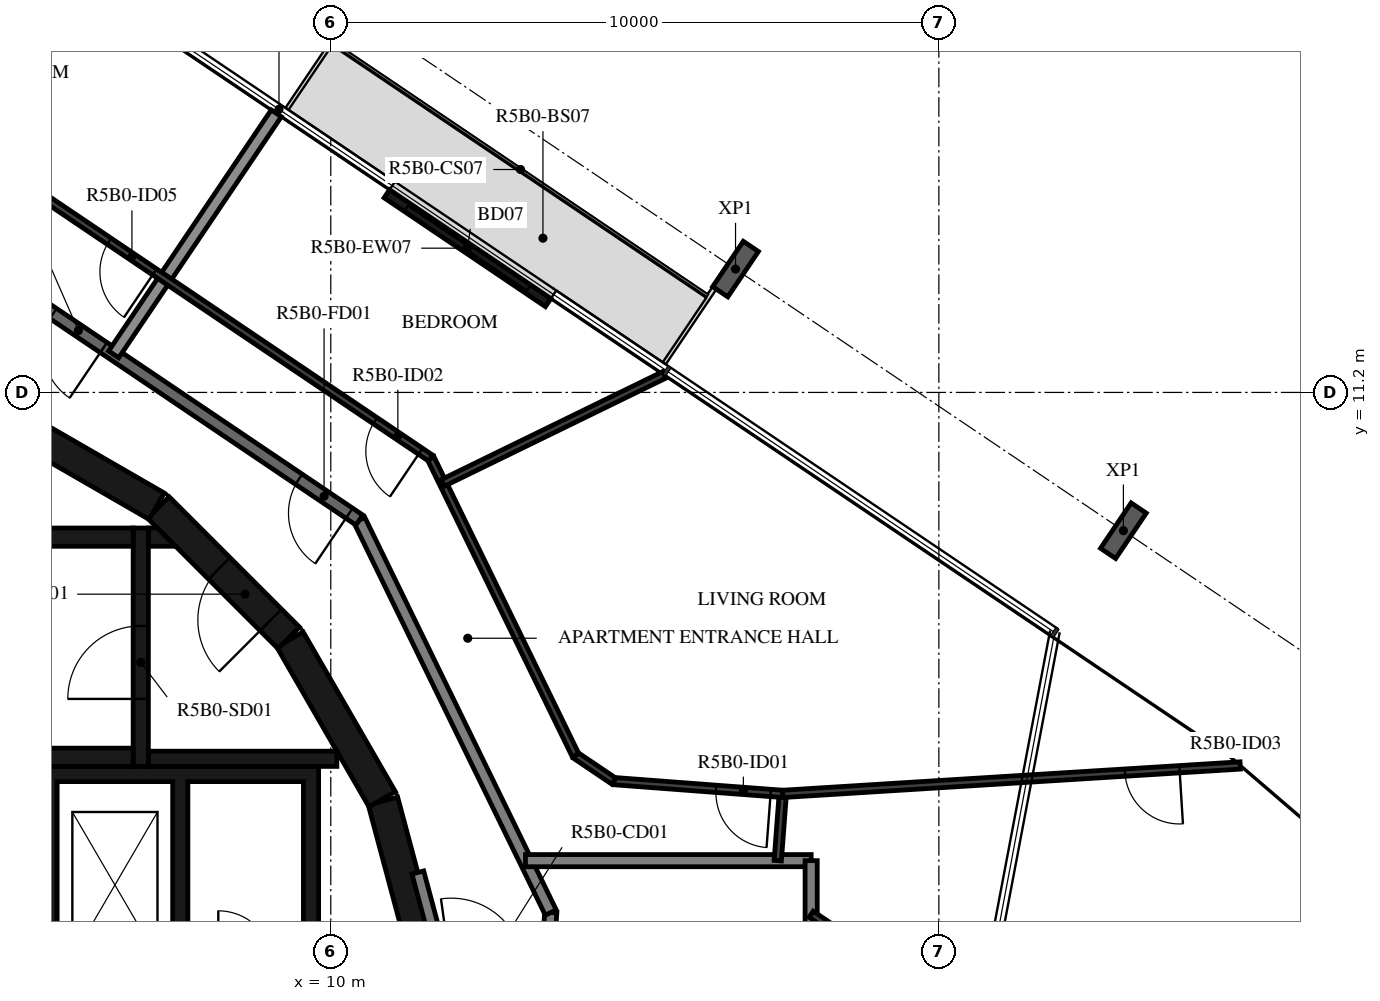
"""IFC4 building model, lengths in metres.
Left out: names, types, materials, properties, quantities, classifications, styles, units other than length and angle.
Written with IfcOpenShell. Run it as: python <this file> out.ifc"""

import sys

from ifc_helpers import new_model, si_unit, direction, frame, frame_2d, origin, origin_2d, place, context, subcontext, project, spatial, polyline, rectangle, i_section, outline, extrude, element, fill, save


model = new_model("IFC4")
c1 = context("Model", 3, precision=1e-05, world=origin(), true_north=direction((0.0, 1.0)))
c2 = subcontext(c1, "Body", "Model", "MODEL_VIEW")
j1 = project(units=[si_unit("LENGTHUNIT", "METRE"), si_unit("PLANEANGLEUNIT", "RADIAN")], contexts=[c1])
p1 = place(None, origin())
s1 = spatial("IfcSite", under=j1, at=p1, CompositionType="ELEMENT")
p2 = place(p1, origin())
s2 = spatial("IfcBuilding", under=s1, at=p2, CompositionType="ELEMENT")
p3 = place(p2, frame((0.0, 0.0, 202.4)))
s3 = spatial("IfcBuildingStorey", under=s2, at=p3, CompositionType="ELEMENT", Elevation=202.4)
for number, where, z_axis, x_axis in (
    (1, (23.035, 8.926, -0.38), (0.0, 0.0, 1.0), (0.829, -0.559, 0.0)),
    (2, (16.656, 13.228, -0.38), (0.0, 0.0, 1.0), (0.829, -0.559, 0.0)),
):
    element("IfcColumn", number, at=place(p3, frame(where, z_axis=z_axis, x_axis=x_axis)), inside=s3, PredefinedType="COLUMN", context=c2, shape_type="SweptSolid", body=[
        extrude(i_section(OverallWidth=0.3, OverallDepth=0.9, WebThickness=0.019, FlangeThickness=0.035, FilletRadius=0.03, at=origin_2d()), origin(), (0.0, 0.0, 1.0), 3.5),
    ])
p4 = place(p3, frame((13.574, 12.677, 0.0), z_axis=(0.0, 0.0, 1.0), x_axis=(-0.829068838882, 0.55914654644, 0.0)))
e3 = element("IfcWall", 3, at=p4, inside=s3, PredefinedType="STANDARD", context=c2, shape_type="SweptSolid", body=[
    extrude(rectangle(XDim=3.2, YDim=0.16, at=frame_2d((1.6, 0.0))), origin(), (0.0, 0.0, 1.0), 3.12),
])
p5 = place(p4, frame((0.4, 0.0, 0.0)))
e4 = element("IfcOpeningElement", 4, at=p5, cuts=e3, PredefinedType="OPENING", context=c2, shape_type="SweptSolid", body=[
    extrude(rectangle(XDim=2.4, YDim=2.4, at=frame_2d((1.2, 1.2))), frame((0.0, 0.09, 0.0), z_axis=(0.0, -1.0, 0.0), x_axis=(1.0, 0.0, 0.0)), (0.0, 0.0, 1.0), 0.18),
])
for number, where, z_axis, x_axis in (
    (5, (11.643, 1.55, 0.0), (0.0, 0.0, 1.0), (-0.259, 0.966, 0.0)),
    (6, (10.845, 4.51, 0.0), (0.0, 0.0, 1.0), (-0.5, 0.866, 0.0)),
):
    element("IfcWall", number, at=place(p3, frame(where, z_axis=z_axis, x_axis=x_axis)), inside=s3, PredefinedType="SHEAR", context=c2, shape_type="SweptSolid", body=[
        extrude(rectangle(XDim=3.033, YDim=0.5, at=frame_2d((1.516, 0.0))), origin(), (0.0, 0.0, 1.0), 3.12),
    ])
p6 = place(p3, frame((9.308, 7.164, 0.0), z_axis=(0.0, 0.0, 1.0), x_axis=(-0.707106781187, 0.707106781187, 0.0)))
e7 = element("IfcWall", 7, at=p6, inside=s3, PredefinedType="SHEAR", context=c2, shape_type="SweptSolid", body=[
    extrude(rectangle(XDim=3.032, YDim=0.5, at=frame_2d((1.516, 0.0))), origin(), (0.0, 0.0, 1.0), 3.12),
])
p7 = place(p6, frame((0.416, 0.0, 0.0)))
e8 = element("IfcOpeningElement", 8, at=p7, cuts=e7, PredefinedType="OPENING", context=c2, shape_type="SweptSolid", body=[
    extrude(rectangle(XDim=1.2, YDim=2.1, at=frame_2d((0.6, 1.05))), frame((0.0, 0.26, 0.0), z_axis=(0.0, -1.0, 0.0), x_axis=(1.0, 0.0, 0.0)), (0.0, 0.0, 1.0), 0.52),
])
p8 = place(p3, frame((7.137, 9.329, 0.0), z_axis=(0.0, 0.0, 1.0), x_axis=(-0.865975092491, 0.500087131594, 0.0)))
e9 = element("IfcWall", 9, at=p8, inside=s3, PredefinedType="SHEAR", context=c2, shape_type="SweptSolid", body=[
    extrude(rectangle(XDim=3.033, YDim=0.5, at=frame_2d((1.516, 0.0))), origin(), (0.0, 0.0, 1.0), 3.12),
])
for number, where, z_axis, x_axis in (
    (10, (0.0, 5.2, 0.0), (0.0, 0.0, 1.0), (1.0, 0.0, 0.0)),
    (11, (0.0, 8.82, 0.0), (0.0, 0.0, 1.0), (1.0, 0.0, 0.0)),
):
    element("IfcWall", number, at=place(p3, frame(where, z_axis=z_axis, x_axis=x_axis)), inside=s3, PredefinedType="SHEAR", context=c2, shape_type="SweptSolid", body=[
        extrude(rectangle(XDim=6.75, YDim=0.3, at=frame_2d((3.375, 0.0))), origin(), (0.0, 0.0, 1.0), 3.12),
    ])
p9 = place(p3, frame((6.875, 5.05, 0.0), z_axis=(0.0, 0.0, 1.0), x_axis=(0.0, 1.0, 0.0)))
e12 = element("IfcWall", 12, at=p9, inside=s3, PredefinedType="SHEAR", context=c2, shape_type="SweptSolid", body=[
    extrude(rectangle(XDim=3.92, YDim=0.25, at=frame_2d((1.96, 0.0))), origin(), (0.0, 0.0, 1.0), 3.12),
])
p10 = place(p9, frame((1.11, 0.0, 0.0)))
e13 = element("IfcOpeningElement", 13, at=p10, cuts=e12, PredefinedType="OPENING", context=c2, shape_type="SweptSolid", body=[
    extrude(rectangle(XDim=1.2, YDim=2.1, at=frame_2d((0.6, 1.05))), frame((0.0, 0.135, 0.0), z_axis=(0.0, -1.0, 0.0), x_axis=(1.0, 0.0, 0.0)), (0.0, 0.0, 1.0), 0.27),
])
p11 = place(p3, frame((7.0, 5.175, 0.0), z_axis=(0.0, 0.0, 1.0), x_axis=(1.0, 0.0, 0.0)))
e14 = element("IfcWall", 14, at=p11, inside=s3, PredefinedType="SHEAR", context=c2, shape_type="SweptSolid", body=[
    extrude(rectangle(XDim=3.1, YDim=0.25, at=frame_2d((1.55, 0.0))), origin(), (0.0, 0.0, 1.0), 3.12),
])
p12 = place(p3, origin())
e15 = element("IfcWall", 15, at=p12, inside=s3, PredefinedType="SHEAR", context=c2, shape_type="SweptSolid", body=[
    extrude(outline(polyline([(7.448, 8.67), (7.0, 8.67), (7.0, 8.97), (7.148, 8.97), (7.448, 8.67)])), origin(), (0.0, 0.0, 1.0), 3.12),
])
p13 = place(p3, origin())
e16 = element("IfcWall", 16, at=p13, inside=s3, PredefinedType="SHEAR", context=c2, shape_type="SweptSolid", body=[
    extrude(outline(polyline([(-9.55, 4.8), (-1.2, 4.8), (-1.2, 1.9), (-0.95, 1.9), (-0.95, 4.8), (0.95, 4.8), (0.95, 1.9), (1.2, 1.9), (1.2, 4.8), (3.1, 4.8), (3.1, 1.9), (3.35, 1.9), (3.35, 4.8), (5.25, 4.8), (5.25, 1.9), (5.5, 1.9), (5.5, 4.8), (7.4, 4.8), (7.4, 1.9), (7.65, 1.9), (7.65, 4.8), (9.55, 4.8), (9.55, 1.9), (9.8, 1.9), (9.8, 4.8), (9.8, 5.05), (-9.8, 5.05), (-9.8, 4.8), (-9.8, 1.9), (-9.55, 1.9), (-9.55, 4.8)])), origin(), (0.0, 0.0, 1.0), 3.12),
])
p14 = place(p3, frame((11.87, 1.668, 0.0), z_axis=(0.0, 0.0, 1.0), x_axis=(-0.258836880648, 0.965921047093, 0.0)))
e17 = element("IfcWall", 17, at=p14, inside=s3, PredefinedType="STANDARD", context=c2, shape_type="SweptSolid", body=[
    extrude(rectangle(XDim=1.695, YDim=0.2, at=frame_2d((0.848, 0.0))), origin(), (0.0, 0.0, 1.0), 3.12),
])
p15 = place(p3, frame((13.566, 1.906, 0.0), z_axis=(0.0, 0.0, 1.0), x_axis=(0.07005495793, 0.997543133338, 0.0)))
e18 = element("IfcWall", 18, at=p15, inside=s3, PredefinedType="STANDARD", context=c2, shape_type="SweptSolid", body=[
    extrude(rectangle(XDim=0.742, YDim=0.2, at=frame_2d((0.371, 0.0))), origin(), (0.0, 0.0, 1.0), 3.12),
])
p16 = place(p3, frame((13.618, 2.647, 0.0), z_axis=(0.0, 0.0, 1.0), x_axis=(-0.438366026218, 0.898796543751, 0.0)))
e19 = element("IfcWall", 19, at=p16, inside=s3, PredefinedType="STANDARD", context=c2, shape_type="SweptSolid", body=[
    extrude(rectangle(XDim=7.181, YDim=0.2, at=frame_2d((3.591, 0.0))), origin(), (0.0, 0.0, 1.0), 3.12),
])
p17 = place(p3, frame((10.47, 9.101, 0.0), z_axis=(0.0, 0.0, 1.0), x_axis=(-0.829035841718, 0.559195469534, 0.0)))
e20 = element("IfcWall", 20, at=p17, inside=s3, PredefinedType="STANDARD", context=c2, shape_type="SweptSolid", body=[
    extrude(rectangle(XDim=7.181, YDim=0.2, at=frame_2d((3.591, 0.0))), origin(), (0.0, 0.0, 1.0), 3.12),
])
p18 = place(p17, frame((0.2, 0.0, 0.0)))
e21 = element("IfcOpeningElement", 21, at=p18, cuts=e20, PredefinedType="OPENING", context=c2, shape_type="SweptSolid", body=[
    extrude(rectangle(XDim=1.0, YDim=2.1, at=frame_2d((0.5, 1.05))), frame((0.0, 0.11, 0.0), z_axis=(0.0, -1.0, 0.0), x_axis=(1.0, 0.0, 0.0)), (0.0, 0.0, 1.0), 0.22),
])
p19 = place(p17, frame((5.073, 0.0, 0.0)))
e22 = element("IfcOpeningElement", 22, at=p19, cuts=e20, PredefinedType="OPENING", context=c2, shape_type="SweptSolid", body=[
    extrude(rectangle(XDim=1.0, YDim=2.1, at=frame_2d((0.5, 1.05))), frame((0.0, 0.11, 0.0), z_axis=(0.0, -1.0, 0.0), x_axis=(1.0, 0.0, 0.0)), (0.0, 0.0, 1.0), 0.22),
])
p20 = place(p3, frame((17.9, 3.5, 0.0), z_axis=(0.0, 0.0, 1.0), x_axis=(-1.0, 0.0, 0.0)))
e23 = element("IfcWall", 23, at=p20, inside=s3, PredefinedType="STANDARD", context=c2, shape_type="SweptSolid", body=[
    extrude(rectangle(XDim=4.698, YDim=0.2, at=frame_2d((2.349, 0.0))), origin(), (0.0, 0.0, 1.0), 3.12),
])
p21 = place(p3, frame((17.9, -3.5, 0.0), z_axis=(0.0, 0.0, 1.0), x_axis=(0.0, 1.0, 0.0)))
e24 = element("IfcWall", 24, at=p21, inside=s3, PredefinedType="STANDARD", context=c2, shape_type="SweptSolid", body=[
    extrude(rectangle(XDim=7.0, YDim=0.2, at=frame_2d((3.5, 0.0))), origin(), (0.0, 0.0, 1.0), 3.12),
])
p22 = place(p3, frame((9.104, 15.79, 0.0), z_axis=(0.0, 0.0, 1.0), x_axis=(-0.559193912135, -0.829036892201, 0.0)))
e25 = element("IfcWall", 25, at=p22, inside=s3, PredefinedType="STANDARD", context=c2, shape_type="SweptSolid", body=[
    extrude(rectangle(XDim=4.781, YDim=0.2, at=frame_2d((2.39, 0.0))), origin(), (0.0, 0.0, 1.0), 2.73),
])
p23 = place(p3, frame((17.351, 3.5, 0.0), z_axis=(0.0, 0.0, 1.0), x_axis=(0.075374124137, 0.997155324616, 0.0)))
e26 = element("IfcWall", 26, at=p23, inside=s3, PredefinedType="PARTITIONING", context=c2, shape_type="SweptSolid", body=[
    extrude(rectangle(XDim=1.101, YDim=0.12, at=frame_2d((0.551, 0.0))), origin(), (0.0, 0.0, 1.0), 3.12),
])
p24 = place(p3, frame((17.434, 4.598, 0.0), z_axis=(0.0, 0.0, 1.0), x_axis=(-0.997152077354, 0.075417071205, 0.0)))
e27 = element("IfcWall", 27, at=p24, inside=s3, PredefinedType="PARTITIONING", context=c2, shape_type="SweptSolid", body=[
    extrude(rectangle(XDim=2.787, YDim=0.12, at=frame_2d((1.394, 0.0))), origin(), (0.0, 0.0, 1.0), 3.12),
])
p25 = place(p24, frame((0.2, 0.0, 0.0)))
e28 = element("IfcOpeningElement", 28, at=p25, cuts=e27, PredefinedType="OPENING", context=c2, shape_type="SweptSolid", body=[
    extrude(rectangle(XDim=0.9, YDim=2.1, at=frame_2d((0.45, 1.05))), frame((0.0, 0.07, 0.0), z_axis=(0.0, -1.0, 0.0), x_axis=(1.0, 0.0, 0.0)), (0.0, 0.0, 1.0), 0.14),
])
p26 = place(p3, frame((14.654, 4.808, 0.0), z_axis=(0.0, 0.0, 1.0), x_axis=(-0.829065184024, 0.559151965604, 0.0)))
e29 = element("IfcWall", 29, at=p26, inside=s3, PredefinedType="PARTITIONING", context=c2, shape_type="SweptSolid", body=[
    extrude(rectangle(XDim=0.758, YDim=0.12, at=frame_2d((0.379, 0.0))), origin(), (0.0, 0.0, 1.0), 3.12),
])
p27 = place(p3, frame((14.026, 5.232, 0.0), z_axis=(0.0, 0.0, 1.0), x_axis=(-0.438374985284, 0.89879217413, 0.0)))
e30 = element("IfcWall", 30, at=p27, inside=s3, PredefinedType="PARTITIONING", context=c2, shape_type="SweptSolid", body=[
    extrude(rectangle(XDim=5.438, YDim=0.12, at=frame_2d((2.719, 0.0))), origin(), (0.0, 0.0, 1.0), 3.12),
])
p28 = place(p3, frame((11.642, 10.12, 0.0), z_axis=(0.0, 0.0, 1.0), x_axis=(-0.829032241779, 0.55920080659, 0.0)))
e31 = element("IfcWall", 31, at=p28, inside=s3, PredefinedType="PARTITIONING", context=c2, shape_type="SweptSolid", body=[
    extrude(rectangle(XDim=7.985, YDim=0.12, at=frame_2d((3.992, 0.0))), origin(), (0.0, 0.0, 1.0), 3.12),
])
p29 = place(p28, frame((0.2, 0.0, 0.0)))
e32 = element("IfcOpeningElement", 32, at=p29, cuts=e31, PredefinedType="OPENING", context=c2, shape_type="SweptSolid", body=[
    extrude(rectangle(XDim=0.9, YDim=2.1, at=frame_2d((0.45, 1.05))), frame((0.0, 0.07, 0.0), z_axis=(0.0, -1.0, 0.0), x_axis=(1.0, 0.0, 0.0)), (0.0, 0.0, 1.0), 0.14),
])
p30 = place(p28, frame((5.475, 0.0, 0.0)))
e33 = element("IfcOpeningElement", 33, at=p30, cuts=e31, PredefinedType="OPENING", context=c2, shape_type="SweptSolid", body=[
    extrude(rectangle(XDim=0.9, YDim=2.1, at=frame_2d((0.45, 1.05))), frame((0.0, 0.07, 0.0), z_axis=(0.0, -1.0, 0.0), x_axis=(1.0, 0.0, 0.0)), (0.0, 0.0, 1.0), 0.14),
])
p31 = place(p3, frame((21.141, 0.433, 0.0), z_axis=(0.0, 0.0, 1.0), x_axis=(-0.829049908454, 0.559174614313, 0.0)))
e34 = element("IfcWall", 34, at=p31, inside=s3, PredefinedType="PARTITIONING", context=c2, shape_type="SweptSolid", body=[
    extrude(rectangle(XDim=3.909, YDim=0.12, at=frame_2d((1.955, 0.0))), origin(), (0.0, 0.0, 1.0), 3.12),
])
p32 = place(p31, frame((0.8, 0.0, 0.0)))
e35 = element("IfcOpeningElement", 35, at=p32, cuts=e34, PredefinedType="OPENING", context=c2, shape_type="SweptSolid", body=[
    extrude(rectangle(XDim=0.8, YDim=2.1, at=frame_2d((0.4, 1.05))), frame((0.0, 0.07, 0.0), z_axis=(0.0, -1.0, 0.0), x_axis=(1.0, 0.0, 0.0)), (0.0, 0.0, 1.0), 0.14),
])
p33 = place(p3, frame((24.956, 5.065, 0.0), z_axis=(0.0, 0.0, 1.0), x_axis=(-0.998076202118, -0.061999151332, 0.0)))
e36 = element("IfcWall", 36, at=p33, inside=s3, PredefinedType="PARTITIONING", context=c2, shape_type="SweptSolid", body=[
    extrude(rectangle(XDim=7.537, YDim=0.12, at=frame_2d((3.769, 0.0))), origin(), (0.0, 0.0, 1.0), 3.12),
])
p34 = place(p33, frame((1.0, 0.0, 0.0)))
e37 = element("IfcOpeningElement", 37, at=p34, cuts=e36, PredefinedType="OPENING", context=c2, shape_type="SweptSolid", body=[
    extrude(rectangle(XDim=0.9, YDim=2.1, at=frame_2d((0.45, 1.05))), frame((0.0, 0.07, 0.0), z_axis=(0.0, -1.0, 0.0), x_axis=(1.0, 0.0, 0.0)), (0.0, 0.0, 1.0), 0.14),
])
p35 = place(p3, frame((21.95, -0.382, 0.0), z_axis=(0.0, 0.0, 1.0), x_axis=(0.844596663126, 0.535403097336, 0.0)))
e38 = element("IfcWall", 38, at=p35, inside=s3, PredefinedType="PARTITIONING", context=c2, shape_type="SweptSolid", body=[
    extrude(rectangle(XDim=6.022, YDim=0.12, at=frame_2d((3.011, 0.0))), origin(), (0.0, 0.0, 1.0), 2.73),
])
p36 = place(p35, frame((0.6, 0.0, 0.0)))
e39 = element("IfcOpeningElement", 39, at=p36, cuts=e38, PredefinedType="OPENING", context=c2, shape_type="SweptSolid", body=[
    extrude(rectangle(XDim=0.9, YDim=2.1, at=frame_2d((0.45, 1.05))), frame((0.0, 0.07, 0.0), z_axis=(0.0, -1.0, 0.0), x_axis=(1.0, 0.0, 0.0)), (0.0, 0.0, 1.0), 0.14),
])
p37 = place(p3, frame((15.482, 11.487, 0.0), z_axis=(0.0, 0.0, 1.0), x_axis=(-0.898807251285, -0.438344071521, 0.0)))
e40 = element("IfcWall", 40, at=p37, inside=s3, PredefinedType="PARTITIONING", context=c2, shape_type="SweptSolid", body=[
    extrude(rectangle(XDim=4.051, YDim=0.12, at=frame_2d((2.025, 0.0))), origin(), (0.0, 0.0, 1.0), 3.12),
])
p38 = place(p5, origin())
e41 = element("IfcDoor", 41, at=p38, inside=s3, OperationType="DOUBLE_DOOR_SLIDING", PredefinedType="DOOR", context=c2, shape_type="SweptSolid", body=[
    extrude(rectangle(XDim=2.4, YDim=2.4, at=frame_2d((1.2, 1.2))), frame((0.0, 0.025, 0.0), z_axis=(0.0, -1.0, 0.0), x_axis=(1.0, 0.0, 0.0)), (0.0, 0.0, 1.0), 0.05),
])
fill(e4, e41)
p39 = place(p10, origin())
e42 = element("IfcDoor", 42, at=p39, inside=s3, OperationType="SINGLE_SWING_LEFT", PredefinedType="DOOR", context=c2, shape_type="SweptSolid", body=[
    extrude(rectangle(XDim=1.2, YDim=2.1, at=frame_2d((0.6, 1.05))), frame((0.0, 0.025, 0.0), z_axis=(0.0, -1.0, 0.0), x_axis=(1.0, 0.0, 0.0)), (0.0, 0.0, 1.0), 0.05),
])
fill(e13, e42)
p40 = place(p7, origin())
e43 = element("IfcDoor", 43, at=p40, inside=s3, OperationType="SINGLE_SWING_RIGHT", PredefinedType="DOOR", context=c2, shape_type="SweptSolid", body=[
    extrude(rectangle(XDim=1.2, YDim=2.1, at=frame_2d((0.6, 1.05))), frame((0.0, 0.025, 0.0), z_axis=(0.0, -1.0, 0.0), x_axis=(1.0, 0.0, 0.0)), (0.0, 0.0, 1.0), 0.05),
])
fill(e8, e43)
p41 = place(p18, origin())
e44 = element("IfcDoor", 44, at=p41, inside=s3, OperationType="SINGLE_SWING_LEFT", PredefinedType="DOOR", context=c2, shape_type="SweptSolid", body=[
    extrude(rectangle(XDim=1.0, YDim=2.1, at=frame_2d((0.5, 1.05))), frame((0.0, 0.025, 0.0), z_axis=(0.0, -1.0, 0.0), x_axis=(1.0, 0.0, 0.0)), (0.0, 0.0, 1.0), 0.05),
])
fill(e21, e44)
p42 = place(p25, origin())
e45 = element("IfcDoor", 45, at=p42, inside=s3, OperationType="SINGLE_SWING_LEFT", PredefinedType="DOOR", context=c2, shape_type="SweptSolid", body=[
    extrude(rectangle(XDim=0.9, YDim=2.1, at=frame_2d((0.45, 1.05))), frame((0.0, 0.025, 0.0), z_axis=(0.0, -1.0, 0.0), x_axis=(1.0, 0.0, 0.0)), (0.0, 0.0, 1.0), 0.05),
])
fill(e28, e45)
p43 = place(p29, origin())
e46 = element("IfcDoor", 46, at=p43, inside=s3, OperationType="SINGLE_SWING_LEFT", PredefinedType="DOOR", context=c2, shape_type="SweptSolid", body=[
    extrude(rectangle(XDim=0.9, YDim=2.1, at=frame_2d((0.45, 1.05))), frame((0.0, 0.025, 0.0), z_axis=(0.0, -1.0, 0.0), x_axis=(1.0, 0.0, 0.0)), (0.0, 0.0, 1.0), 0.05),
])
fill(e32, e46)
p44 = place(p34, origin())
e47 = element("IfcDoor", 47, at=p44, inside=s3, OperationType="SINGLE_SWING_LEFT", PredefinedType="DOOR", context=c2, shape_type="SweptSolid", body=[
    extrude(rectangle(XDim=0.9, YDim=2.1, at=frame_2d((0.45, 1.05))), frame((0.0, 0.025, 0.0), z_axis=(0.0, -1.0, 0.0), x_axis=(1.0, 0.0, 0.0)), (0.0, 0.0, 1.0), 0.05),
])
fill(e37, e47)
p45 = place(p19, origin())
e48 = element("IfcDoor", 48, at=p45, inside=s3, OperationType="SINGLE_SWING_RIGHT", PredefinedType="DOOR", context=c2, shape_type="SweptSolid", body=[
    extrude(rectangle(XDim=1.0, YDim=2.1, at=frame_2d((0.5, 1.05))), frame((0.0, 0.025, 0.0), z_axis=(0.0, -1.0, 0.0), x_axis=(1.0, 0.0, 0.0)), (0.0, 0.0, 1.0), 0.05),
])
fill(e22, e48)
p46 = place(p30, origin())
e49 = element("IfcDoor", 49, at=p46, inside=s3, OperationType="SINGLE_SWING_RIGHT", PredefinedType="DOOR", context=c2, shape_type="SweptSolid", body=[
    extrude(rectangle(XDim=0.9, YDim=2.1, at=frame_2d((0.45, 1.05))), frame((0.0, 0.025, 0.0), z_axis=(0.0, -1.0, 0.0), x_axis=(1.0, 0.0, 0.0)), (0.0, 0.0, 1.0), 0.05),
])
fill(e33, e49)
save(model, sys.argv[1])
